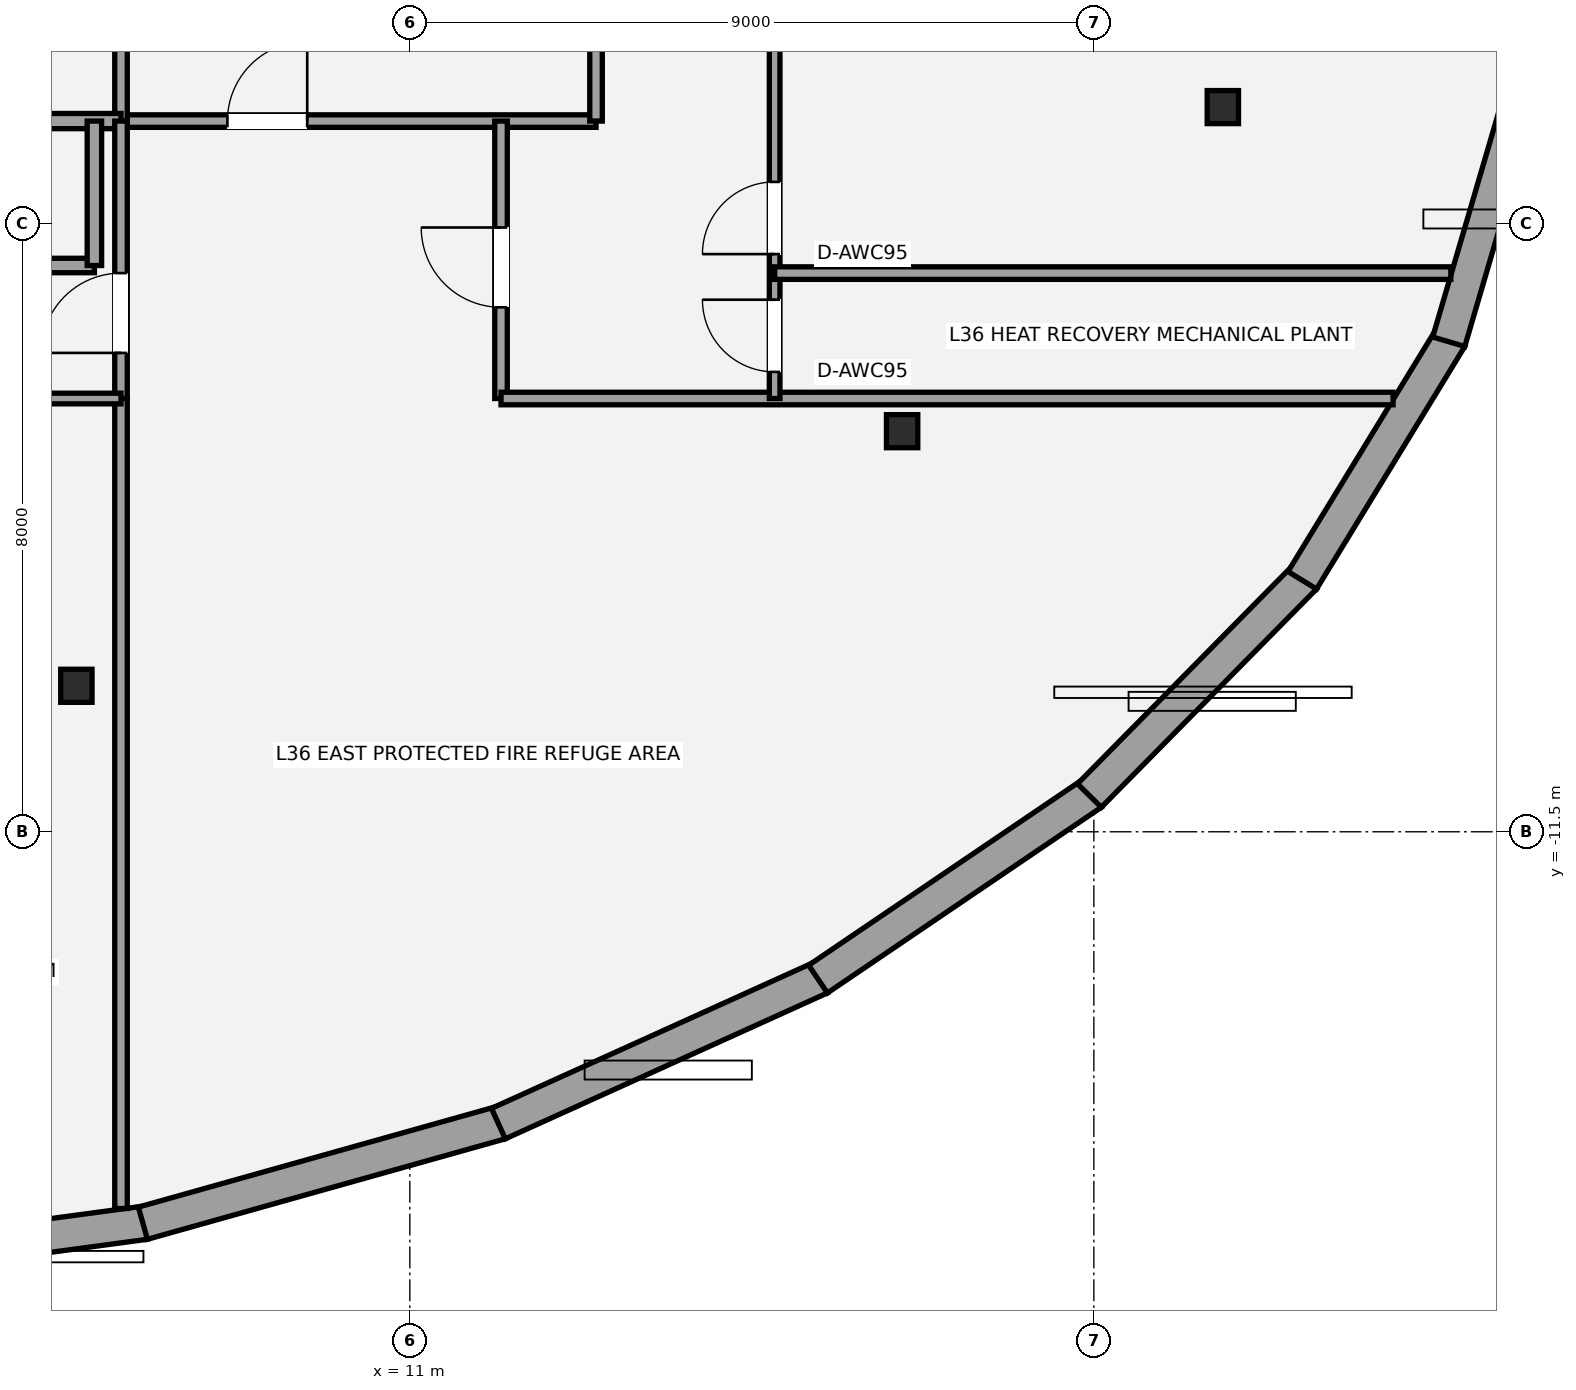
"""IFC4 building model, lengths in metres.
Left out: names, types, materials, properties, quantities, classifications, styles, units other than length and angle.
Written with IfcOpenShell. Run it as: python <this file> out.ifc"""

import sys

from ifc_helpers import new_model, si_unit, direction, frame, frame_2d, origin, origin_2d, place, context, subcontext, project, spatial, rectangle, i_section, extrude, element, fill, save


model = new_model("IFC4")
c1 = context("Model", 3, precision=1e-05, world=origin(), true_north=direction((0.0, 1.0)))
c2 = subcontext(c1, "Body", "Model", "MODEL_VIEW")
j1 = project(units=[si_unit("LENGTHUNIT", "METRE"), si_unit("PLANEANGLEUNIT", "RADIAN")], contexts=[c1])
p1 = place(None, origin())
s1 = spatial("IfcSite", under=j1, at=p1, CompositionType="ELEMENT")
p2 = place(p1, origin())
s2 = spatial("IfcBuilding", under=s1, at=p2, CompositionType="ELEMENT")
p3 = place(p2, frame((0.0, 0.0, 135.1)))
s3 = spatial("IfcBuildingStorey", under=s2, at=p3, CompositionType="ELEMENT", Elevation=135.1)
for number, where, z_axis, x_axis in (
    (1, (6.613, -9.579, 0.0), (0.0, 0.0, 1.0), (1.0, 0.0, 0.0)),
    (2, (17.477, -6.229, 0.0), (0.0, 0.0, 1.0), (1.0, 0.0, 0.0)),
    (3, (21.697, -1.966, 0.0), (0.0, 0.0, 1.0), (1.0, 0.0, 0.0)),
):
    element("IfcColumn", number, at=place(p3, frame(where, z_axis=z_axis, x_axis=x_axis)), inside=s3, PredefinedType="COLUMN", context=c2, shape_type="SweptSolid", body=[
        extrude(i_section(OverallWidth=0.412, OverallDepth=0.435, WebThickness=0.036, FlangeThickness=0.057, at=origin_2d()), origin(), (0.0, 0.0, 1.0), 4.5),
    ])
p4 = place(p3, frame((7.518, -16.643, 0.0), z_axis=(0.0, 0.0, 1.0), x_axis=(-0.99103751038, -0.133583880086, 0.0)))
e4 = element("IfcWall", 4, at=p4, inside=s3, PredefinedType="STANDARD", context=c2, shape_type="SweptSolid", body=[
    extrude(rectangle(XDim=5.044, YDim=0.44, at=frame_2d((2.522, 0.0))), origin(), (0.0, 0.0, 1.0), 3.498),
])
p5 = place(p3, frame((12.197, -15.328, 0.0), z_axis=(0.0, 0.0, 1.0), x_axis=(-0.962790668442, -0.270248272446, 0.0)))
e5 = element("IfcWall", 5, at=p5, inside=s3, PredefinedType="STANDARD", context=c2, shape_type="SweptSolid", body=[
    extrude(rectangle(XDim=4.891, YDim=0.44, at=frame_2d((2.445, 0.0))), origin(), (0.0, 0.0, 1.0), 3.498),
])
p6 = place(p3, frame((16.403, -13.42, 0.0), z_axis=(0.0, 0.0, 1.0), x_axis=(-0.910938924115, -0.412541242221, 0.0)))
e6 = element("IfcWall", 6, at=p6, inside=s3, PredefinedType="STANDARD", context=c2, shape_type="SweptSolid", body=[
    extrude(rectangle(XDim=4.652, YDim=0.44, at=frame_2d((2.326, 0.0))), origin(), (0.0, 0.0, 1.0), 3.498),
])
p7 = place(p3, frame((19.975, -10.996, 0.0), z_axis=(0.0, 0.0, 1.0), x_axis=(-0.827816201219, -0.56099940909, 0.0)))
e7 = element("IfcWall", 7, at=p7, inside=s3, PredefinedType="STANDARD", context=c2, shape_type="SweptSolid", body=[
    extrude(rectangle(XDim=4.354, YDim=0.44, at=frame_2d((2.177, 0.0))), origin(), (0.0, 0.0, 1.0), 3.498),
])
p8 = place(p3, frame((22.773, -8.152, 0.0), z_axis=(0.0, 0.0, 1.0), x_axis=(-0.702094935552, -0.712083352897, 0.0)))
e8 = element("IfcWall", 8, at=p8, inside=s3, PredefinedType="STANDARD", context=c2, shape_type="SweptSolid", body=[
    extrude(rectangle(XDim=4.033, YDim=0.44, at=frame_2d((2.017, 0.0))), origin(), (0.0, 0.0, 1.0), 3.498),
])
p9 = place(p3, frame((24.693, -5.0, 0.0), z_axis=(0.0, 0.0, 1.0), x_axis=(-0.521476412293, -0.853265698022, 0.0)))
e9 = element("IfcWall", 9, at=p9, inside=s3, PredefinedType="STANDARD", context=c2, shape_type="SweptSolid", body=[
    extrude(rectangle(XDim=3.74, YDim=0.44, at=frame_2d((1.87, 0.0))), origin(), (0.0, 0.0, 1.0), 3.498),
])
p10 = place(p3, frame((25.664, -1.665, 0.0), z_axis=(0.0, 0.0, 1.0), x_axis=(-0.28170956188, -0.959499725245, 0.0)))
e10 = element("IfcWall", 10, at=p10, inside=s3, PredefinedType="STANDARD", context=c2, shape_type="SweptSolid", body=[
    extrude(rectangle(XDim=3.531, YDim=0.44, at=frame_2d((1.765, 0.0))), origin(), (0.0, 0.0, 1.0), 3.498),
])
p11 = place(p3, frame((7.2, -2.15, 0.0), z_axis=(0.0, 0.0, 1.0), x_axis=(1.0, 0.0, 0.0)))
e11 = element("IfcWall", 11, at=p11, inside=s3, PredefinedType="PARTITIONING", context=c2, shape_type="SweptSolid", body=[
    extrude(rectangle(XDim=6.25, YDim=0.165, at=frame_2d((3.125, 0.0))), origin(), (0.0, 0.0, 1.0), 4.28),
])
p12 = place(p11, frame((1.4, 0.0, 0.0)))
e12 = element("IfcOpeningElement", 12, at=p12, cuts=e11, PredefinedType="OPENING", context=c2, shape_type="SweptSolid", body=[
    extrude(rectangle(XDim=1.05, YDim=2.15, at=frame_2d((0.525, 1.075))), frame((0.0, 0.093, 0.0), z_axis=(0.0, -1.0, 0.0), x_axis=(1.0, 0.0, 0.0)), (0.0, 0.0, 1.0), 0.185),
])
p13 = place(p3, frame((7.2, -2.15, 0.0), z_axis=(0.0, 0.0, 1.0), x_axis=(0.0, 1.0, 0.0)))
e13 = element("IfcWall", 13, at=p13, inside=s3, PredefinedType="PARTITIONING", context=c2, shape_type="SweptSolid", body=[
    extrude(rectangle(XDim=3.4, YDim=0.165, at=frame_2d((1.7, 0.0))), origin(), (0.0, 0.0, 1.0), 4.28),
])
p14 = place(p3, frame((13.45, -2.15, 0.0), z_axis=(0.0, 0.0, 1.0), x_axis=(0.0, 1.0, 0.0)))
e14 = element("IfcWall", 14, at=p14, inside=s3, PredefinedType="PARTITIONING", context=c2, shape_type="SweptSolid", body=[
    extrude(rectangle(XDim=3.4, YDim=0.165, at=frame_2d((1.7, 0.0))), origin(), (0.0, 0.0, 1.0), 2.47),
])
p15 = place(p3, frame((4.95, -2.15, 0.0), z_axis=(0.0, 0.0, 1.0), x_axis=(1.0, 0.0, 0.0)))
e15 = element("IfcWall", 15, at=p15, inside=s3, PredefinedType="SOLIDWALL", context=c2, shape_type="SweptSolid", body=[
    extrude(rectangle(XDim=2.25, YDim=0.2, at=frame_2d((1.125, 0.0))), origin(), (0.0, 0.0, 1.0), 2.47),
])
p16 = place(p3, frame((2.1, -4.05, 0.0), z_axis=(0.0, 0.0, 1.0), x_axis=(1.0, 0.0, 0.0)))
e16 = element("IfcWall", 16, at=p16, inside=s3, PredefinedType="PLUMBINGWALL", context=c2, shape_type="SweptSolid", body=[
    extrude(rectangle(XDim=4.75, YDim=0.19, at=frame_2d((2.375, 0.0))), origin(), (0.0, 0.0, 1.0), 2.47),
])
p17 = place(p16, frame((1.8, 0.0, 0.0)))
e17 = element("IfcOpeningElement", 17, at=p17, cuts=e16, PredefinedType="OPENING", context=c2, shape_type="SweptSolid", body=[
    extrude(rectangle(XDim=0.9, YDim=2.1, at=frame_2d((0.45, 1.05))), frame((0.0, 0.105, 0.0), z_axis=(0.0, -1.0, 0.0), x_axis=(1.0, 0.0, 0.0)), (0.0, 0.0, 1.0), 0.21),
])
p18 = place(p3, frame((6.85, -4.05, 0.0), z_axis=(0.0, 0.0, 1.0), x_axis=(0.0, 1.0, 0.0)))
e18 = element("IfcWall", 18, at=p18, inside=s3, PredefinedType="PLUMBINGWALL", context=c2, shape_type="SweptSolid", body=[
    extrude(rectangle(XDim=1.9, YDim=0.19, at=frame_2d((0.95, 0.0))), origin(), (0.0, 0.0, 1.0), 4.28),
])
p19 = place(p3, frame((7.2, -5.8, 0.0), z_axis=(0.0, 0.0, 1.0), x_axis=(0.0, 1.0, 0.0)))
e19 = element("IfcWall", 19, at=p19, inside=s3, PredefinedType="PARTITIONING", context=c2, shape_type="SweptSolid", body=[
    extrude(rectangle(XDim=3.65, YDim=0.165, at=frame_2d((1.825, 0.0))), origin(), (0.0, 0.0, 1.0), 4.28),
])
p20 = place(p19, frame((0.6, 0.0, 0.0)))
e20 = element("IfcOpeningElement", 20, at=p20, cuts=e19, PredefinedType="OPENING", context=c2, shape_type="SweptSolid", body=[
    extrude(rectangle(XDim=1.05, YDim=2.15, at=frame_2d((0.525, 1.075))), frame((0.0, 0.093, 0.0), z_axis=(0.0, -1.0, 0.0), x_axis=(1.0, 0.0, 0.0)), (0.0, 0.0, 1.0), 0.185),
])
p21 = place(p3, frame((12.2, -5.8, 0.0), z_axis=(0.0, 0.0, 1.0), x_axis=(0.0, 1.0, 0.0)))
e21 = element("IfcWall", 21, at=p21, inside=s3, PredefinedType="PARTITIONING", context=c2, shape_type="SweptSolid", body=[
    extrude(rectangle(XDim=3.65, YDim=0.165, at=frame_2d((1.825, 0.0))), origin(), (0.0, 0.0, 1.0), 4.28),
])
p22 = place(p21, frame((1.2, 0.0, 0.0)))
e22 = element("IfcOpeningElement", 22, at=p22, cuts=e21, PredefinedType="OPENING", context=c2, shape_type="SweptSolid", body=[
    extrude(rectangle(XDim=1.05, YDim=2.15, at=frame_2d((0.525, 1.075))), frame((0.0, 0.093, 0.0), z_axis=(0.0, -1.0, 0.0), x_axis=(1.0, 0.0, 0.0)), (0.0, 0.0, 1.0), 0.185),
])
p23 = place(p3, frame((7.2, -16.456, 0.0), z_axis=(0.0, 0.0, 1.0), x_axis=(0.0, 1.0, 0.0)))
e23 = element("IfcWall", 23, at=p23, inside=s3, PredefinedType="PARTITIONING", context=c2, shape_type="SweptSolid", body=[
    extrude(rectangle(XDim=10.656, YDim=0.165, at=frame_2d((5.328, 0.0))), origin(), (0.0, 0.0, 1.0), 4.28),
])
p24 = place(p3, frame((12.2, -5.8, 0.0), z_axis=(0.0, 0.0, 1.0), x_axis=(1.0, 0.0, 0.0)))
e24 = element("IfcWall", 24, at=p24, inside=s3, PredefinedType="PARTITIONING", context=c2, shape_type="SweptSolid", body=[
    extrude(rectangle(XDim=11.737, YDim=0.165, at=frame_2d((5.868, 0.0))), origin(), (0.0, 0.0, 1.0), 2.47),
])
p25 = place(p3, frame((-7.2, -5.8, 0.0), z_axis=(0.0, 0.0, 1.0), x_axis=(1.0, 0.0, 0.0)))
e25 = element("IfcWall", 25, at=p25, inside=s3, PredefinedType="PARTITIONING", context=c2, shape_type="SweptSolid", body=[
    extrude(rectangle(XDim=14.4, YDim=0.14, at=frame_2d((7.2, 0.0))), origin(), (0.0, 0.0, 1.0), 2.47),
])
p26 = place(p25, frame((1.8, 0.0, 0.0)))
e26 = element("IfcOpeningElement", 26, at=p26, cuts=e25, PredefinedType="OPENING", context=c2, shape_type="SweptSolid", body=[
    extrude(rectangle(XDim=0.95, YDim=2.15, at=frame_2d((0.475, 1.075))), frame((0.0, 0.08, 0.0), z_axis=(0.0, -1.0, 0.0), x_axis=(1.0, 0.0, 0.0)), (0.0, 0.0, 1.0), 0.16),
])
p27 = place(p25, frame((9.0, 0.0, 0.0)))
e27 = element("IfcOpeningElement", 27, at=p27, cuts=e25, PredefinedType="OPENING", context=c2, shape_type="SweptSolid", body=[
    extrude(rectangle(XDim=0.95, YDim=2.15, at=frame_2d((0.475, 1.075))), frame((0.0, 0.08, 0.0), z_axis=(0.0, -1.0, 0.0), x_axis=(1.0, 0.0, 0.0)), (0.0, 0.0, 1.0), 0.16),
])
p28 = place(p3, frame((15.8, -5.8, 0.0), z_axis=(0.0, 0.0, 1.0), x_axis=(0.0, 1.0, 0.0)))
e28 = element("IfcWall", 28, at=p28, inside=s3, PredefinedType="PARTITIONING", context=c2, shape_type="SweptSolid", body=[
    extrude(rectangle(XDim=11.2, YDim=0.14, at=frame_2d((5.6, 0.0))), origin(), (0.0, 0.0, 1.0), 2.47),
])
p29 = place(p28, frame((0.35, 0.0, 0.0)))
e29 = element("IfcOpeningElement", 29, at=p29, cuts=e28, PredefinedType="OPENING", context=c2, shape_type="SweptSolid", body=[
    extrude(rectangle(XDim=0.95, YDim=2.15, at=frame_2d((0.475, 1.075))), frame((0.0, 0.08, 0.0), z_axis=(0.0, -1.0, 0.0), x_axis=(1.0, 0.0, 0.0)), (0.0, 0.0, 1.0), 0.16),
])
p30 = place(p28, frame((1.9, 0.0, 0.0)))
e30 = element("IfcOpeningElement", 30, at=p30, cuts=e28, PredefinedType="OPENING", context=c2, shape_type="SweptSolid", body=[
    extrude(rectangle(XDim=0.95, YDim=2.15, at=frame_2d((0.475, 1.075))), frame((0.0, 0.08, 0.0), z_axis=(0.0, -1.0, 0.0), x_axis=(1.0, 0.0, 0.0)), (0.0, 0.0, 1.0), 0.16),
])
p31 = place(p3, frame((15.8, -4.15, 0.0), z_axis=(0.0, 0.0, 1.0), x_axis=(1.0, 0.0, 0.0)))
e31 = element("IfcWall", 31, at=p31, inside=s3, PredefinedType="PARTITIONING", context=c2, shape_type="SweptSolid", body=[
    extrude(rectangle(XDim=8.897, YDim=0.165, at=frame_2d((4.448, 0.0))), origin(), (0.0, 0.0, 1.0), 2.47),
])
p32 = place(p12, origin())
e32 = element("IfcDoor", 32, at=p32, inside=s3, OperationType="SINGLE_SWING_RIGHT", PredefinedType="DOOR", context=c2, shape_type="SweptSolid", body=[
    extrude(rectangle(XDim=1.05, YDim=2.15, at=frame_2d((0.525, 1.075))), frame((0.0, 0.025, 0.0), z_axis=(0.0, -1.0, 0.0), x_axis=(1.0, 0.0, 0.0)), (0.0, 0.0, 1.0), 0.05),
])
fill(e12, e32)
p33 = place(p20, origin())
e33 = element("IfcDoor", 33, at=p33, inside=s3, OperationType="SINGLE_SWING_LEFT", PredefinedType="DOOR", context=c2, shape_type="SweptSolid", body=[
    extrude(rectangle(XDim=1.05, YDim=2.15, at=frame_2d((0.525, 1.075))), frame((0.0, 0.025, 0.0), z_axis=(0.0, -1.0, 0.0), x_axis=(1.0, 0.0, 0.0)), (0.0, 0.0, 1.0), 0.05),
])
fill(e20, e33)
p34 = place(p22, origin())
e34 = element("IfcDoor", 34, at=p34, inside=s3, OperationType="SINGLE_SWING_RIGHT", PredefinedType="DOOR", context=c2, shape_type="SweptSolid", body=[
    extrude(rectangle(XDim=1.05, YDim=2.15, at=frame_2d((0.525, 1.075))), frame((0.0, 0.025, 0.0), z_axis=(0.0, -1.0, 0.0), x_axis=(1.0, 0.0, 0.0)), (0.0, 0.0, 1.0), 0.05),
])
fill(e22, e34)
p35 = place(p29, origin())
e35 = element("IfcDoor", 35, at=p35, inside=s3, OperationType="SINGLE_SWING_RIGHT", PredefinedType="DOOR", context=c2, shape_type="SweptSolid", body=[
    extrude(rectangle(XDim=0.95, YDim=2.15, at=frame_2d((0.475, 1.075))), frame((0.0, 0.025, 0.0), z_axis=(0.0, -1.0, 0.0), x_axis=(1.0, 0.0, 0.0)), (0.0, 0.0, 1.0), 0.05),
])
fill(e29, e35)
p36 = place(p30, origin())
e36 = element("IfcDoor", 36, at=p36, inside=s3, OperationType="SINGLE_SWING_LEFT", PredefinedType="DOOR", context=c2, shape_type="SweptSolid", body=[
    extrude(rectangle(XDim=0.95, YDim=2.15, at=frame_2d((0.475, 1.075))), frame((0.0, 0.025, 0.0), z_axis=(0.0, -1.0, 0.0), x_axis=(1.0, 0.0, 0.0)), (0.0, 0.0, 1.0), 0.05),
])
fill(e30, e36)
save(model, sys.argv[1])
